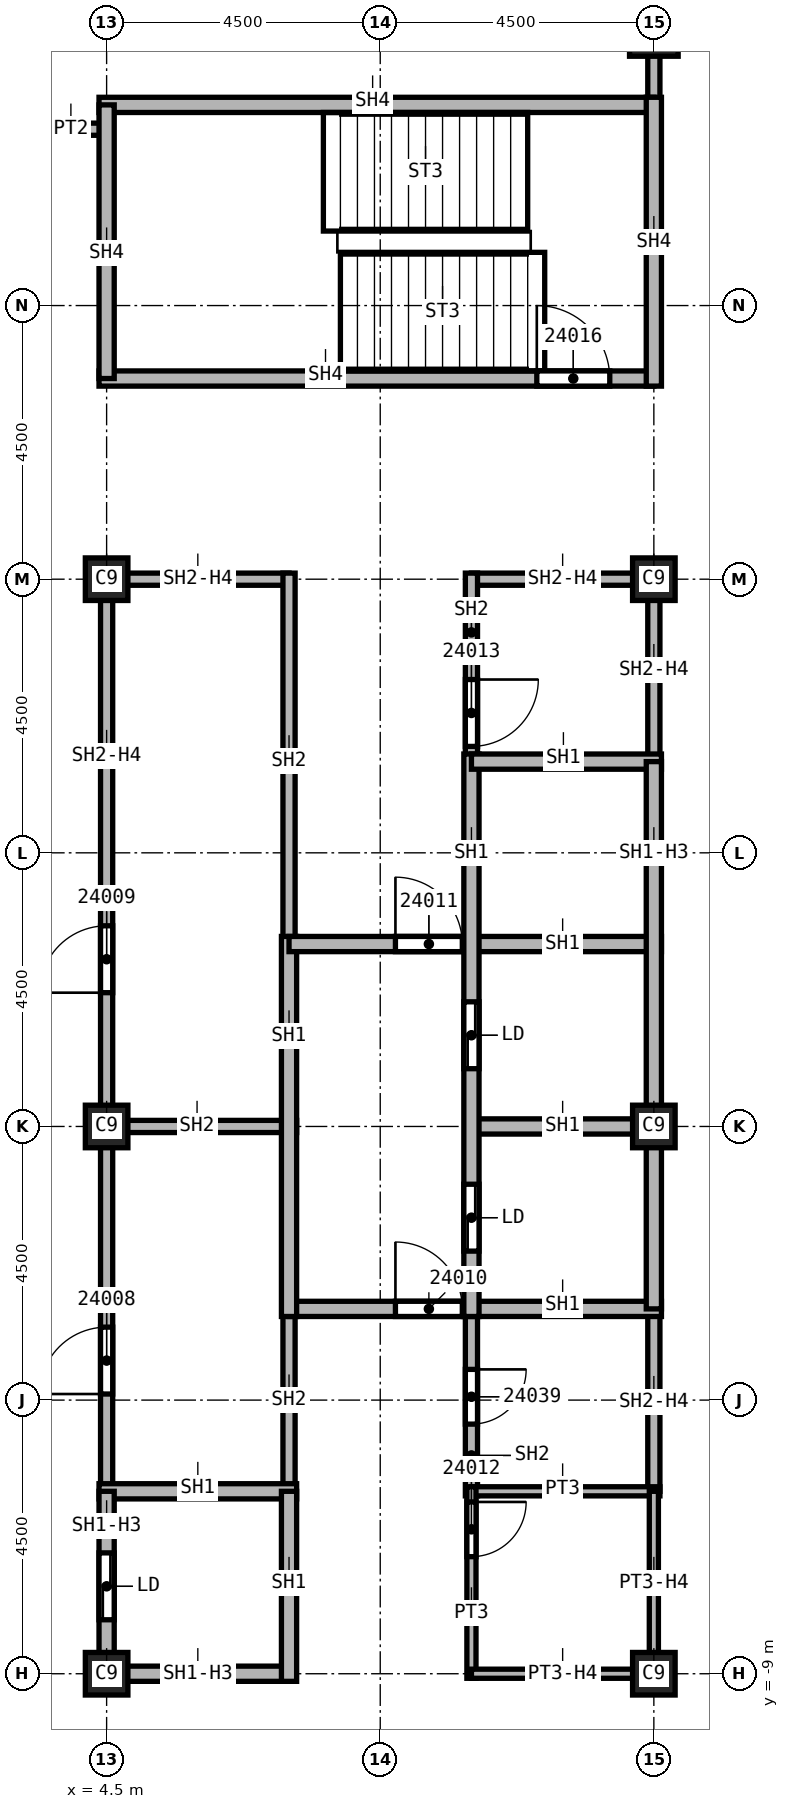
"""IFC4 building model, lengths in metres.
Left out: names, types, materials, properties, quantities, classifications, styles, units other than length and angle.
Written with IfcOpenShell. Run it as: python <this file> out.ifc"""

import sys

from ifc_helpers import new_model, si_unit, direction, frame, frame_2d, origin, origin_2d, place, context, subcontext, project, spatial, rectangle, extrude, element, fill, save


model = new_model("IFC4")
c1 = context("Model", 3, precision=1e-05, world=origin(), true_north=direction((0.0, 1.0)))
c2 = subcontext(c1, "Body", "Model", "MODEL_VIEW")
j1 = project(units=[si_unit("LENGTHUNIT", "METRE"), si_unit("PLANEANGLEUNIT", "RADIAN")], contexts=[c1])
p1 = place(None, origin())
s1 = spatial("IfcSite", under=j1, at=p1, CompositionType="ELEMENT")
p2 = place(p1, origin())
s2 = spatial("IfcBuilding", under=s1, at=p2, CompositionType="ELEMENT")
p3 = place(p2, frame((0.0, 0.0, 338.0)))
s3 = spatial("IfcBuildingStorey", under=s2, at=p3, CompositionType="ELEMENT", Elevation=338.0)
p4 = place(p3, frame((13.5, 18.0, 0.0), z_axis=(0.0, 0.0, 1.0), x_axis=(1.0, 0.0, 0.0)))
e1 = element("IfcColumn", 1, at=p4, inside=s3, PredefinedType="COLUMN", context=c2, shape_type="SweptSolid", body=[
    extrude(rectangle(XDim=0.8, YDim=0.8, at=origin_2d()), origin(), (0.0, 0.0, 1.0), 3.74),
])
for number, where, z_axis, x_axis in (
    (2, (4.5, 0.0, 0.0), (0.0, 0.0, 1.0), (1.0, 0.0, 0.0)),
    (3, (4.5, 9.0, 0.0), (0.0, 0.0, 1.0), (1.0, 0.0, 0.0)),
    (4, (4.5, -9.0, 0.0), (0.0, 0.0, 1.0), (1.0, 0.0, 0.0)),
    (5, (13.5, 0.0, 0.0), (0.0, 0.0, 1.0), (1.0, 0.0, 0.0)),
    (6, (13.5, 9.0, 0.0), (0.0, 0.0, 1.0), (1.0, 0.0, 0.0)),
    (7, (13.5, -9.0, 0.0), (0.0, 0.0, 1.0), (1.0, 0.0, 0.0)),
):
    element("IfcColumn", number, at=place(p3, frame(where, z_axis=z_axis, x_axis=x_axis)), inside=s3, PredefinedType="COLUMN", context=c2, shape_type="SweptSolid", body=[
        extrude(rectangle(XDim=0.7, YDim=0.7, at=origin_2d()), origin(), (0.0, 0.0, 1.0), 3.74),
    ])
p5 = place(p3, frame((3.45, 16.4, 0.0), z_axis=(0.0, 0.0, 1.0), x_axis=(1.0, 0.0, 0.0)))
e8 = element("IfcWall", 8, at=p5, inside=s3, PredefinedType="PARTITIONING", context=c2, shape_type="SweptSolid", body=[
    extrude(rectangle(XDim=1.05, YDim=0.2, at=frame_2d((0.525, 0.0))), origin(), (0.0, 0.0, 1.0), 3.74),
])
p6 = place(p3, frame((13.5, 16.675, 0.0), z_axis=(0.0, 0.0, 1.0), x_axis=(0.0, 1.0, 0.0)))
e9 = element("IfcWall", 9, at=p6, inside=s3, PredefinedType="PARTITIONING", context=c2, shape_type="SweptSolid", body=[
    extrude(rectangle(XDim=8.275, YDim=0.2, at=frame_2d((4.137, 0.0))), origin(), (0.0, 0.0, 1.0), 3.74),
])
p7 = place(p6, frame((2.8, 0.0, 0.0)))
e10 = element("IfcOpeningElement", 10, at=p7, cuts=e9, PredefinedType="OPENING", context=c2, shape_type="SweptSolid", body=[
    extrude(rectangle(XDim=1.0, YDim=2.1, at=frame_2d((0.5, 1.05))), frame((0.0, 0.1, 0.0), z_axis=(0.0, -1.0, 0.0), x_axis=(1.0, 0.0, 0.0)), (0.0, 0.0, 1.0), 0.2),
])
p8 = place(p3, frame((4.4, 0.0, 0.0), z_axis=(0.0, 0.0, 1.0), x_axis=(1.0, 0.0, 0.0)))
e11 = element("IfcWall", 11, at=p8, inside=s3, PredefinedType="SOLIDWALL", context=c2, shape_type="SweptSolid", body=[
    extrude(rectangle(XDim=3.225, YDim=0.2, at=frame_2d((1.613, 0.0))), origin(), (0.0, 0.0, 1.0), 3.74),
])
p9 = place(p3, frame((4.5, -6.0, 0.0), z_axis=(0.0, 0.0, 1.0), x_axis=(0.0, 1.0, 0.0)))
e12 = element("IfcWall", 12, at=p9, inside=s3, PredefinedType="SOLIDWALL", context=c2, shape_type="SweptSolid", body=[
    extrude(rectangle(XDim=15.1, YDim=0.2, at=frame_2d((7.55, 0.0))), origin(), (0.0, 0.0, 1.0), 3.062),
])
p10 = place(p9, frame((1.6, 0.0, 0.0)))
e13 = element("IfcOpeningElement", 13, at=p10, cuts=e12, PredefinedType="OPENING", context=c2, shape_type="SweptSolid", body=[
    extrude(rectangle(XDim=1.1, YDim=2.1, at=frame_2d((0.55, 1.05))), frame((0.0, 0.1, 0.0), z_axis=(0.0, -1.0, 0.0), x_axis=(1.0, 0.0, 0.0)), (0.0, 0.0, 1.0), 0.2),
])
p11 = place(p9, frame((8.2, 0.0, 0.0)))
e14 = element("IfcOpeningElement", 14, at=p11, cuts=e12, PredefinedType="OPENING", context=c2, shape_type="SweptSolid", body=[
    extrude(rectangle(XDim=1.1, YDim=2.1, at=frame_2d((0.55, 1.05))), frame((0.0, 0.1, 0.0), z_axis=(0.0, -1.0, 0.0), x_axis=(1.0, 0.0, 0.0)), (0.0, 0.0, 1.0), 0.2),
])
p12 = place(p3, frame((4.5, 9.0, 0.0), z_axis=(0.0, 0.0, 1.0), x_axis=(1.0, 0.0, 0.0)))
e15 = element("IfcWall", 15, at=p12, inside=s3, PredefinedType="SOLIDWALL", context=c2, shape_type="SweptSolid", body=[
    extrude(rectangle(XDim=3.0, YDim=0.2, at=frame_2d((1.5, 0.0))), origin(), (0.0, 0.0, 1.0), 3.062),
])
p13 = place(p3, frame((7.5, -2.875, 0.0), z_axis=(0.0, 0.0, 1.0), x_axis=(0.0, -1.0, 0.0)))
e16 = element("IfcWall", 16, at=p13, inside=s3, PredefinedType="SOLIDWALL", context=c2, shape_type="SweptSolid", body=[
    extrude(rectangle(XDim=3.125, YDim=0.2, at=frame_2d((1.562, 0.0))), origin(), (0.0, 0.0, 1.0), 3.74),
])
p14 = place(p3, frame((7.5, 9.1, 0.0), z_axis=(0.0, 0.0, 1.0), x_axis=(0.0, -1.0, 0.0)))
e17 = element("IfcWall", 17, at=p14, inside=s3, PredefinedType="SOLIDWALL", context=c2, shape_type="SweptSolid", body=[
    extrude(rectangle(XDim=6.225, YDim=0.2, at=frame_2d((3.113, 0.0))), origin(), (0.0, 0.0, 1.0), 3.74),
])
p15 = place(p3, frame((10.5, -2.875, 0.0), z_axis=(0.0, 0.0, 1.0), x_axis=(0.0, -1.0, 0.0)))
e18 = element("IfcWall", 18, at=p15, inside=s3, PredefinedType="SOLIDWALL", context=c2, shape_type="SweptSolid", body=[
    extrude(rectangle(XDim=3.2, YDim=0.2, at=frame_2d((1.6, 0.0))), origin(), (0.0, 0.0, 1.0), 3.74),
])
p16 = place(p15, frame((1.12, 0.0, 0.0)))
e19 = element("IfcOpeningElement", 19, at=p16, cuts=e18, PredefinedType="OPENING", context=c2, shape_type="SweptSolid", body=[
    extrude(rectangle(XDim=0.9, YDim=2.1, at=frame_2d((0.45, 1.05))), frame((0.0, 0.1, 0.0), z_axis=(0.0, -1.0, 0.0), x_axis=(1.0, 0.0, 0.0)), (0.0, 0.0, 1.0), 0.2),
])
p17 = place(p3, frame((10.5, 9.0, 0.0), z_axis=(0.0, 0.0, 1.0), x_axis=(1.0, 0.0, 0.0)))
e20 = element("IfcWall", 20, at=p17, inside=s3, PredefinedType="SOLIDWALL", context=c2, shape_type="SweptSolid", body=[
    extrude(rectangle(XDim=3.0, YDim=0.2, at=frame_2d((1.5, 0.0))), origin(), (0.0, 0.0, 1.0), 3.062),
])
p18 = place(p3, frame((10.5, 9.1, 0.0), z_axis=(0.0, 0.0, 1.0), x_axis=(0.0, -1.0, 0.0)))
e21 = element("IfcWall", 21, at=p18, inside=s3, PredefinedType="SOLIDWALL", context=c2, shape_type="SweptSolid", body=[
    extrude(rectangle(XDim=3.225, YDim=0.2, at=frame_2d((1.613, 0.0))), origin(), (0.0, 0.0, 1.0), 3.74),
])
p19 = place(p18, frame((1.75, 0.0, 0.0)))
e22 = element("IfcOpeningElement", 22, at=p19, cuts=e21, PredefinedType="OPENING", context=c2, shape_type="SweptSolid", body=[
    extrude(rectangle(XDim=1.1, YDim=2.1, at=frame_2d((0.55, 1.05))), frame((0.0, 0.1, 0.0), z_axis=(0.0, -1.0, 0.0), x_axis=(1.0, 0.0, 0.0)), (0.0, 0.0, 1.0), 0.2),
])
p20 = place(p3, frame((13.5, -3.0, 0.0), z_axis=(0.0, 0.0, 1.0), x_axis=(0.0, -1.0, 0.0)))
e23 = element("IfcWall", 23, at=p20, inside=s3, PredefinedType="SOLIDWALL", context=c2, shape_type="SweptSolid", body=[
    extrude(rectangle(XDim=3.0, YDim=0.2, at=frame_2d((1.5, 0.0))), origin(), (0.0, 0.0, 1.0), 3.062),
])
p21 = place(p3, frame((13.5, 9.1, 0.0), z_axis=(0.0, 0.0, 1.0), x_axis=(0.0, -1.0, 0.0)))
e24 = element("IfcWall", 24, at=p21, inside=s3, PredefinedType="SOLIDWALL", context=c2, shape_type="SweptSolid", body=[
    extrude(rectangle(XDim=3.1, YDim=0.2, at=frame_2d((1.55, 0.0))), origin(), (0.0, 0.0, 1.0), 3.062),
])
p22 = place(p3, frame((4.375, -6.0, 0.0), z_axis=(0.0, 0.0, 1.0), x_axis=(1.0, 0.0, 0.0)))
e25 = element("IfcWall", 25, at=p22, inside=s3, PredefinedType="SOLIDWALL", context=c2, shape_type="SweptSolid", body=[
    extrude(rectangle(XDim=3.25, YDim=0.25, at=frame_2d((1.625, 0.0))), origin(), (0.0, 0.0, 1.0), 3.74),
])
p23 = place(p3, frame((4.5, -9.125, 0.0), z_axis=(0.0, 0.0, 1.0), x_axis=(0.0, 1.0, 0.0)))
e26 = element("IfcWall", 26, at=p23, inside=s3, PredefinedType="SOLIDWALL", context=c2, shape_type="SweptSolid", body=[
    extrude(rectangle(XDim=3.125, YDim=0.25, at=frame_2d((1.562, 0.0))), origin(), (0.0, 0.0, 1.0), 3.062),
])
p24 = place(p23, frame((1.012, 0.0, 0.0)))
e27 = element("IfcOpeningElement", 27, at=p24, cuts=e26, PredefinedType="OPENING", context=c2, shape_type="SweptSolid", body=[
    extrude(rectangle(XDim=1.1, YDim=2.1, at=frame_2d((0.55, 1.05))), frame((0.0, 0.125, 0.0), z_axis=(0.0, -1.0, 0.0), x_axis=(1.0, 0.0, 0.0)), (0.0, 0.0, 1.0), 0.25),
])
p25 = place(p3, frame((7.5, -9.0, 0.0), z_axis=(0.0, 0.0, 1.0), x_axis=(-1.0, 0.0, 0.0)))
e28 = element("IfcWall", 28, at=p25, inside=s3, PredefinedType="SOLIDWALL", context=c2, shape_type="SweptSolid", body=[
    extrude(rectangle(XDim=3.0, YDim=0.25, at=frame_2d((1.5, 0.0))), origin(), (0.0, 0.0, 1.0), 3.062),
])
p26 = place(p3, frame((7.5, -6.0, 0.0), z_axis=(0.0, 0.0, 1.0), x_axis=(0.0, -1.0, 0.0)))
e29 = element("IfcWall", 29, at=p26, inside=s3, PredefinedType="SOLIDWALL", context=c2, shape_type="SweptSolid", body=[
    extrude(rectangle(XDim=3.125, YDim=0.25, at=frame_2d((1.562, 0.0))), origin(), (0.0, 0.0, 1.0), 3.74),
])
p27 = place(p3, frame((7.5, -3.0, 0.0), z_axis=(0.0, 0.0, 1.0), x_axis=(1.0, 0.0, 0.0)))
e30 = element("IfcWall", 30, at=p27, inside=s3, PredefinedType="SOLIDWALL", context=c2, shape_type="SweptSolid", body=[
    extrude(rectangle(XDim=6.125, YDim=0.25, at=frame_2d((3.062, 0.0))), origin(), (0.0, 0.0, 1.0), 3.74),
])
p28 = place(p27, frame((1.75, 0.0, 0.0)))
e31 = element("IfcOpeningElement", 31, at=p28, cuts=e30, PredefinedType="OPENING", context=c2, shape_type="SweptSolid", body=[
    extrude(rectangle(XDim=1.1, YDim=2.1, at=frame_2d((0.55, 1.05))), frame((0.0, 0.125, 0.0), z_axis=(0.0, -1.0, 0.0), x_axis=(1.0, 0.0, 0.0)), (0.0, 0.0, 1.0), 0.25),
])
p29 = place(p3, frame((7.5, 3.125, 0.0), z_axis=(0.0, 0.0, 1.0), x_axis=(0.0, -1.0, 0.0)))
e32 = element("IfcWall", 32, at=p29, inside=s3, PredefinedType="SOLIDWALL", context=c2, shape_type="SweptSolid", body=[
    extrude(rectangle(XDim=6.25, YDim=0.25, at=frame_2d((3.125, 0.0))), origin(), (0.0, 0.0, 1.0), 3.74),
])
p30 = place(p3, frame((7.5, 3.0, 0.0), z_axis=(0.0, 0.0, 1.0), x_axis=(1.0, 0.0, 0.0)))
e33 = element("IfcWall", 33, at=p30, inside=s3, PredefinedType="SOLIDWALL", context=c2, shape_type="SweptSolid", body=[
    extrude(rectangle(XDim=6.125, YDim=0.25, at=frame_2d((3.062, 0.0))), origin(), (0.0, 0.0, 1.0), 3.74),
])
p31 = place(p30, frame((1.75, 0.0, 0.0)))
e34 = element("IfcOpeningElement", 34, at=p31, cuts=e33, PredefinedType="OPENING", context=c2, shape_type="SweptSolid", body=[
    extrude(rectangle(XDim=1.1, YDim=2.1, at=frame_2d((0.55, 1.05))), frame((0.0, 0.125, 0.0), z_axis=(0.0, -1.0, 0.0), x_axis=(1.0, 0.0, 0.0)), (0.0, 0.0, 1.0), 0.25),
])
p32 = place(p3, frame((10.5, 0.0, 0.0), z_axis=(0.0, 0.0, 1.0), x_axis=(1.0, 0.0, 0.0)))
e35 = element("IfcWall", 35, at=p32, inside=s3, PredefinedType="SOLIDWALL", context=c2, shape_type="SweptSolid", body=[
    extrude(rectangle(XDim=3.125, YDim=0.25, at=frame_2d((1.562, 0.0))), origin(), (0.0, 0.0, 1.0), 3.74),
])
p33 = place(p3, frame((10.5, 6.125, 0.0), z_axis=(0.0, 0.0, 1.0), x_axis=(0.0, -1.0, 0.0)))
e36 = element("IfcWall", 36, at=p33, inside=s3, PredefinedType="SOLIDWALL", context=c2, shape_type="SweptSolid", body=[
    extrude(rectangle(XDim=9.25, YDim=0.25, at=frame_2d((4.625, 0.0))), origin(), (0.0, 0.0, 1.0), 3.74),
])
p34 = place(p33, frame((7.075, 0.0, 0.0)))
e37 = element("IfcOpeningElement", 37, at=p34, cuts=e36, PredefinedType="OPENING", context=c2, shape_type="SweptSolid", body=[
    extrude(rectangle(XDim=1.1, YDim=2.1, at=frame_2d((0.55, 1.05))), frame((0.0, 0.125, 0.0), z_axis=(0.0, -1.0, 0.0), x_axis=(1.0, 0.0, 0.0)), (0.0, 0.0, 1.0), 0.25),
])
p35 = place(p33, frame((4.075, 0.0, 0.0)))
e38 = element("IfcOpeningElement", 38, at=p35, cuts=e36, PredefinedType="OPENING", context=c2, shape_type="SweptSolid", body=[
    extrude(rectangle(XDim=1.1, YDim=2.1, at=frame_2d((0.55, 1.05))), frame((0.0, 0.125, 0.0), z_axis=(0.0, -1.0, 0.0), x_axis=(1.0, 0.0, 0.0)), (0.0, 0.0, 1.0), 0.25),
])
p36 = place(p3, frame((10.5, 6.0, 0.0), z_axis=(0.0, 0.0, 1.0), x_axis=(1.0, 0.0, 0.0)))
e39 = element("IfcWall", 39, at=p36, inside=s3, PredefinedType="SOLIDWALL", context=c2, shape_type="SweptSolid", body=[
    extrude(rectangle(XDim=3.125, YDim=0.25, at=frame_2d((1.562, 0.0))), origin(), (0.0, 0.0, 1.0), 3.74),
])
p37 = place(p3, frame((13.5, 6.0, 0.0), z_axis=(0.0, 0.0, 1.0), x_axis=(0.0, -1.0, 0.0)))
e40 = element("IfcWall", 40, at=p37, inside=s3, PredefinedType="SOLIDWALL", context=c2, shape_type="SweptSolid", body=[
    extrude(rectangle(XDim=9.0, YDim=0.25, at=frame_2d((4.5, 0.0))), origin(), (0.0, 0.0, 1.0), 3.062),
])
p38 = place(p3, frame((4.375, 12.3, 0.0), z_axis=(0.0, 0.0, 1.0), x_axis=(1.0, 0.0, 0.0)))
e41 = element("IfcWall", 41, at=p38, inside=s3, PredefinedType="SOLIDWALL", context=c2, shape_type="SweptSolid", body=[
    extrude(rectangle(XDim=9.125, YDim=0.25, at=frame_2d((4.562, 0.0))), origin(), (0.0, 0.0, 1.0), 3.74),
])
p39 = place(p38, frame((7.2, 0.0, 0.0)))
e42 = element("IfcOpeningElement", 42, at=p39, cuts=e41, PredefinedType="OPENING", context=c2, shape_type="SweptSolid", body=[
    extrude(rectangle(XDim=1.2, YDim=2.1, at=frame_2d((0.6, 1.05))), frame((0.0, 0.125, 0.0), z_axis=(0.0, -1.0, 0.0), x_axis=(1.0, 0.0, 0.0)), (0.0, 0.0, 1.0), 0.25),
])
p40 = place(p3, frame((4.375, 16.8, 0.0), z_axis=(0.0, 0.0, 1.0), x_axis=(1.0, 0.0, 0.0)))
e43 = element("IfcWall", 43, at=p40, inside=s3, PredefinedType="SOLIDWALL", context=c2, shape_type="SweptSolid", body=[
    extrude(rectangle(XDim=9.125, YDim=0.25, at=frame_2d((4.562, 0.0))), origin(), (0.0, 0.0, 1.0), 3.74),
])
p41 = place(p3, frame((4.5, 12.3, 0.0), z_axis=(0.0, 0.0, 1.0), x_axis=(0.0, 1.0, 0.0)))
e44 = element("IfcWall", 44, at=p41, inside=s3, PredefinedType="SOLIDWALL", context=c2, shape_type="SweptSolid", body=[
    extrude(rectangle(XDim=4.5, YDim=0.25, at=frame_2d((2.25, 0.0))), origin(), (0.0, 0.0, 1.0), 3.74),
])
p42 = place(p3, frame((13.5, 12.175, 0.0), z_axis=(0.0, 0.0, 1.0), x_axis=(0.0, 1.0, 0.0)))
e45 = element("IfcWall", 45, at=p42, inside=s3, PredefinedType="SOLIDWALL", context=c2, shape_type="SweptSolid", body=[
    extrude(rectangle(XDim=4.75, YDim=0.25, at=frame_2d((2.375, 0.0))), origin(), (0.0, 0.0, 1.0), 3.74),
])
p43 = place(p3, frame((10.5, -6.0, 0.0), z_axis=(0.0, 0.0, 1.0), x_axis=(1.0, 0.0, 0.0)))
e46 = element("IfcWall", 46, at=p43, inside=s3, PredefinedType="PARTITIONING", context=c2, shape_type="SweptSolid", body=[
    extrude(rectangle(XDim=3.1, YDim=0.15, at=frame_2d((1.55, 0.0))), origin(), (0.0, 0.0, 1.0), 3.74),
])
p44 = place(p3, frame((10.5, -5.925, 0.0), z_axis=(0.0, 0.0, 1.0), x_axis=(0.0, -1.0, 0.0)))
e47 = element("IfcWall", 47, at=p44, inside=s3, PredefinedType="PARTITIONING", context=c2, shape_type="SweptSolid", body=[
    extrude(rectangle(XDim=3.15, YDim=0.15, at=frame_2d((1.575, 0.0))), origin(), (0.0, 0.0, 1.0), 3.74),
])
p45 = place(p44, frame((0.25, 0.0, 0.0)))
e48 = element("IfcOpeningElement", 48, at=p45, cuts=e47, PredefinedType="OPENING", context=c2, shape_type="SweptSolid", body=[
    extrude(rectangle(XDim=0.9, YDim=2.1, at=frame_2d((0.45, 1.05))), frame((0.0, 0.075, 0.0), z_axis=(0.0, -1.0, 0.0), x_axis=(1.0, 0.0, 0.0)), (0.0, 0.0, 1.0), 0.15),
])
p46 = place(p3, frame((13.5, -9.0, 0.0), z_axis=(0.0, 0.0, 1.0), x_axis=(-1.0, 0.0, 0.0)))
e49 = element("IfcWall", 49, at=p46, inside=s3, PredefinedType="PARTITIONING", context=c2, shape_type="SweptSolid", body=[
    extrude(rectangle(XDim=3.0, YDim=0.15, at=frame_2d((1.5, 0.0))), origin(), (0.0, 0.0, 1.0), 3.062),
])
p47 = place(p3, frame((13.5, -6.0, 0.0), z_axis=(0.0, 0.0, 1.0), x_axis=(0.0, -1.0, 0.0)))
e50 = element("IfcWall", 50, at=p47, inside=s3, PredefinedType="PARTITIONING", context=c2, shape_type="SweptSolid", body=[
    extrude(rectangle(XDim=3.075, YDim=0.15, at=frame_2d((1.538, 0.0))), origin(), (0.0, 0.0, 1.0), 3.062),
])
p48 = place(p10, origin())
e51 = element("IfcDoor", 51, at=p48, inside=s3, OperationType="SINGLE_SWING_LEFT", PredefinedType="DOOR", context=c2, shape_type="SweptSolid", body=[
    extrude(rectangle(XDim=1.1, YDim=2.1, at=frame_2d((0.55, 1.05))), frame((0.0, 0.025, 0.0), z_axis=(0.0, -1.0, 0.0), x_axis=(1.0, 0.0, 0.0)), (0.0, 0.0, 1.0), 0.05),
])
fill(e13, e51)
p49 = place(p11, origin())
e52 = element("IfcDoor", 52, at=p49, inside=s3, OperationType="SINGLE_SWING_RIGHT", PredefinedType="DOOR", context=c2, shape_type="SweptSolid", body=[
    extrude(rectangle(XDim=1.1, YDim=2.1, at=frame_2d((0.55, 1.05))), frame((0.0, 0.025, 0.0), z_axis=(0.0, -1.0, 0.0), x_axis=(1.0, 0.0, 0.0)), (0.0, 0.0, 1.0), 0.05),
])
fill(e14, e52)
p50 = place(p28, origin())
e53 = element("IfcDoor", 53, at=p50, inside=s3, OperationType="SINGLE_SWING_LEFT", PredefinedType="DOOR", context=c2, shape_type="SweptSolid", body=[
    extrude(rectangle(XDim=1.1, YDim=2.1, at=frame_2d((0.55, 1.05))), frame((0.0, 0.025, 0.0), z_axis=(0.0, -1.0, 0.0), x_axis=(1.0, 0.0, 0.0)), (0.0, 0.0, 1.0), 0.05),
])
fill(e31, e53)
p51 = place(p31, origin())
e54 = element("IfcDoor", 54, at=p51, inside=s3, OperationType="SINGLE_SWING_RIGHT", PredefinedType="DOOR", context=c2, shape_type="SweptSolid", body=[
    extrude(rectangle(XDim=1.1, YDim=2.1, at=frame_2d((0.55, 1.05))), frame((0.0, 0.025, 0.0), z_axis=(0.0, -1.0, 0.0), x_axis=(1.0, 0.0, 0.0)), (0.0, 0.0, 1.0), 0.05),
])
fill(e34, e54)
p52 = place(p45, origin())
e55 = element("IfcDoor", 55, at=p52, inside=s3, OperationType="SINGLE_SWING_LEFT", PredefinedType="DOOR", context=c2, shape_type="SweptSolid", body=[
    extrude(rectangle(XDim=0.9, YDim=2.1, at=frame_2d((0.45, 1.05))), frame((0.0, 0.025, 0.0), z_axis=(0.0, -1.0, 0.0), x_axis=(1.0, 0.0, 0.0)), (0.0, 0.0, 1.0), 0.05),
])
fill(e48, e55)
p53 = place(p19, origin())
e56 = element("IfcDoor", 56, at=p53, inside=s3, OperationType="SINGLE_SWING_RIGHT", PredefinedType="DOOR", context=c2, shape_type="SweptSolid", body=[
    extrude(rectangle(XDim=1.1, YDim=2.1, at=frame_2d((0.55, 1.05))), frame((0.0, 0.025, 0.0), z_axis=(0.0, -1.0, 0.0), x_axis=(1.0, 0.0, 0.0)), (0.0, 0.0, 1.0), 0.05),
])
fill(e22, e56)
p54 = place(p39, origin())
e57 = element("IfcDoor", 57, at=p54, inside=s3, OperationType="SINGLE_SWING_LEFT", PredefinedType="DOOR", context=c2, shape_type="SweptSolid", body=[
    extrude(rectangle(XDim=1.2, YDim=2.1, at=frame_2d((0.6, 1.05))), frame((0.0, 0.025, 0.0), z_axis=(0.0, -1.0, 0.0), x_axis=(1.0, 0.0, 0.0)), (0.0, 0.0, 1.0), 0.05),
])
fill(e42, e57)
p55 = place(p16, origin())
e58 = element("IfcDoor", 58, at=p55, inside=s3, OperationType="SINGLE_SWING_LEFT", PredefinedType="DOOR", context=c2, shape_type="SweptSolid", body=[
    extrude(rectangle(XDim=0.9, YDim=2.1, at=frame_2d((0.45, 1.05))), frame((0.0, 0.025, 0.0), z_axis=(0.0, -1.0, 0.0), x_axis=(1.0, 0.0, 0.0)), (0.0, 0.0, 1.0), 0.05),
])
fill(e19, e58)
p56 = place(p24, origin())
e59 = element("IfcDoor", 59, at=p56, inside=s3, OperationType="SLIDING_TO_LEFT", PredefinedType="DOOR", context=c2, shape_type="SweptSolid", body=[
    extrude(rectangle(XDim=1.1, YDim=2.1, at=frame_2d((0.55, 1.05))), frame((0.0, 0.025, 0.0), z_axis=(0.0, -1.0, 0.0), x_axis=(1.0, 0.0, 0.0)), (0.0, 0.0, 1.0), 0.05),
])
fill(e27, e59)
p57 = place(p34, origin())
e60 = element("IfcDoor", 60, at=p57, inside=s3, OperationType="SLIDING_TO_LEFT", PredefinedType="DOOR", context=c2, shape_type="SweptSolid", body=[
    extrude(rectangle(XDim=1.1, YDim=2.1, at=frame_2d((0.55, 1.05))), frame((0.0, 0.025, 0.0), z_axis=(0.0, -1.0, 0.0), x_axis=(1.0, 0.0, 0.0)), (0.0, 0.0, 1.0), 0.05),
])
fill(e37, e60)
p58 = place(p35, origin())
e61 = element("IfcDoor", 61, at=p58, inside=s3, OperationType="SLIDING_TO_LEFT", PredefinedType="DOOR", context=c2, shape_type="SweptSolid", body=[
    extrude(rectangle(XDim=1.1, YDim=2.1, at=frame_2d((0.55, 1.05))), frame((0.0, 0.025, 0.0), z_axis=(0.0, -1.0, 0.0), x_axis=(1.0, 0.0, 0.0)), (0.0, 0.0, 1.0), 0.05),
])
fill(e38, e61)
save(model, sys.argv[1])
